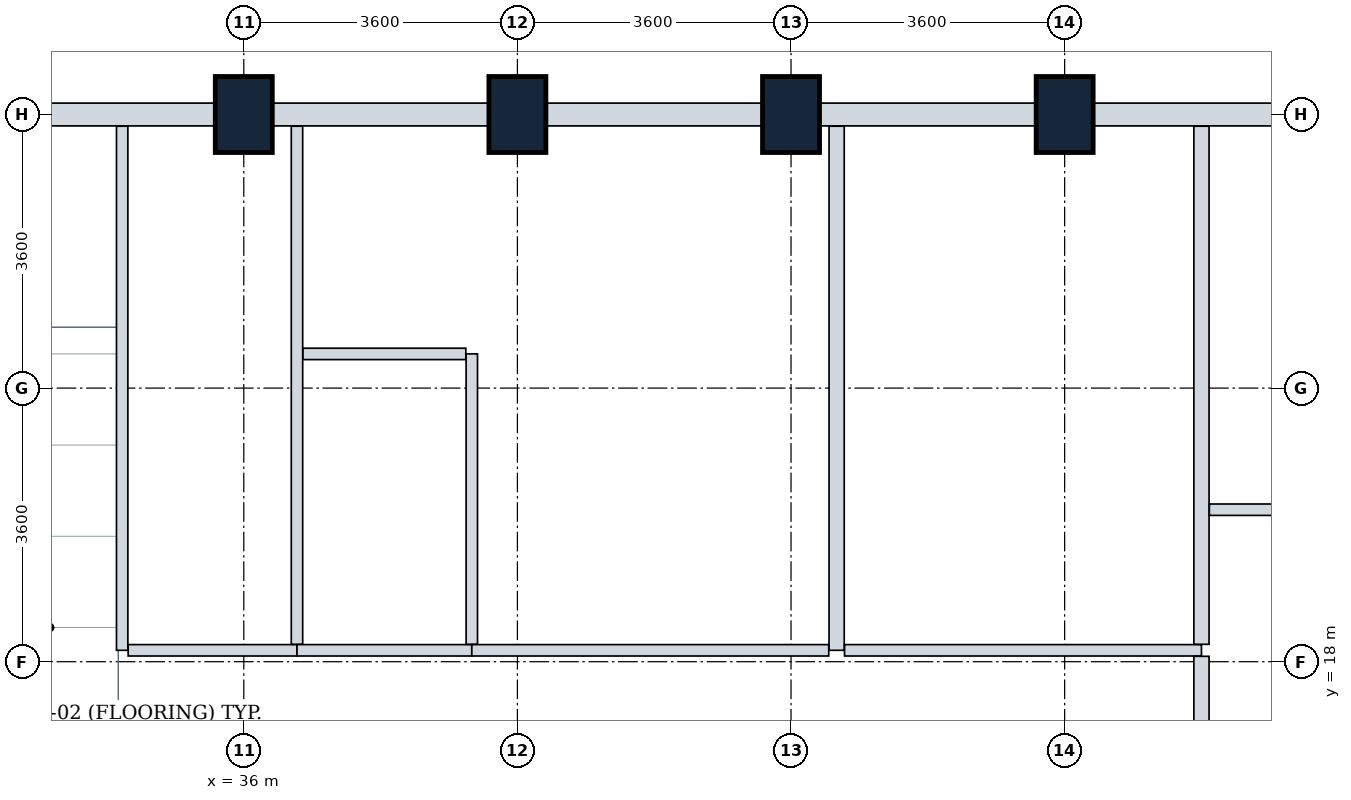
"""IFC4 building model, lengths in metres.
Left out: names, types, materials, properties, quantities, classifications, styles, units other than length and angle.
Written with IfcOpenShell. Run it as: python <this file> out.ifc"""

import sys

from ifc_helpers import new_model, si_unit, direction, frame, frame_2d, origin, origin_2d, place, context, subcontext, project, spatial, rectangle, extrude, element, fill, save


model = new_model("IFC4")
c1 = context("Model", 3, precision=1e-05, world=origin(), true_north=direction((0.0, 1.0)))
c2 = subcontext(c1, "Body", "Model", "MODEL_VIEW")
j1 = project(units=[si_unit("LENGTHUNIT", "METRE"), si_unit("PLANEANGLEUNIT", "RADIAN")], contexts=[c1])
p1 = place(None, origin())
s1 = spatial("IfcSite", under=j1, at=p1, CompositionType="ELEMENT")
p2 = place(p1, origin())
s2 = spatial("IfcBuilding", under=s1, at=p2, CompositionType="ELEMENT")
p3 = place(p2, frame((0.0, 0.0, 139.0)))
s3 = spatial("IfcBuildingStorey", under=s2, at=p3, CompositionType="ELEMENT", Elevation=139.0)
for number, where, z_axis, x_axis in (
    (1, (36.0, 25.2, 0.0), (0.0, 0.0, 1.0), (1.0, 0.0, 0.0)),
    (2, (39.6, 25.2, 0.0), (0.0, 0.0, 1.0), (1.0, 0.0, 0.0)),
    (3, (43.2, 25.2, 0.0), (0.0, 0.0, 1.0), (1.0, 0.0, 0.0)),
    (4, (46.8, 25.2, 0.0), (0.0, 0.0, 1.0), (1.0, 0.0, 0.0)),
):
    element("IfcColumn", number, at=place(p3, frame(where, z_axis=z_axis, x_axis=x_axis)), inside=s3, PredefinedType="COLUMN", context=c2, shape_type="SweptSolid", body=[
        extrude(rectangle(XDim=0.75, YDim=1.0, at=origin_2d()), origin(), (0.0, 0.0, 1.0), 3.8),
    ])
p4 = place(p3, frame((46.8, 25.2, 0.0), z_axis=(0.0, 0.0, 1.0), x_axis=(1.0, 0.0, 0.0)))
e5 = element("IfcWall", 5, at=p4, inside=s3, PredefinedType="STANDARD", context=c2, shape_type="SweptSolid", body=[
    extrude(rectangle(XDim=3.6, YDim=0.3, at=frame_2d((1.8, 0.0))), origin(), (0.0, 0.0, 1.0), 2.93),
])
p5 = place(p3, frame((43.2, 25.2, 0.0), z_axis=(0.0, 0.0, 1.0), x_axis=(1.0, 0.0, 0.0)))
e6 = element("IfcWall", 6, at=p5, inside=s3, PredefinedType="STANDARD", context=c2, shape_type="SweptSolid", body=[
    extrude(rectangle(XDim=3.6, YDim=0.3, at=frame_2d((1.8, 0.0))), origin(), (0.0, 0.0, 1.0), 2.93),
])
p6 = place(p3, frame((39.6, 25.2, 0.0), z_axis=(0.0, 0.0, 1.0), x_axis=(1.0, 0.0, 0.0)))
e7 = element("IfcWall", 7, at=p6, inside=s3, PredefinedType="STANDARD", context=c2, shape_type="SweptSolid", body=[
    extrude(rectangle(XDim=3.6, YDim=0.3, at=frame_2d((1.8, 0.0))), origin(), (0.0, 0.0, 1.0), 2.93),
])
p7 = place(p6, frame((0.75, 0.0, 0.85)))
e8 = element("IfcOpeningElement", 8, at=p7, cuts=e7, PredefinedType="OPENING", context=c2, shape_type="SweptSolid", body=[
    extrude(rectangle(XDim=2.1, YDim=1.35, at=frame_2d((1.05, 0.675))), frame((0.0, 0.16, 0.0), z_axis=(0.0, -1.0, 0.0), x_axis=(1.0, 0.0, 0.0)), (0.0, 0.0, 1.0), 0.32),
])
for number, where, z_axis, x_axis in (
    (9, (36.0, 25.2, 0.0), (0.0, 0.0, 1.0), (1.0, 0.0, 0.0)),
    (10, (32.4, 25.2, 0.0), (0.0, 0.0, 1.0), (1.0, 0.0, 0.0)),
):
    element("IfcWall", number, at=place(p3, frame(where, z_axis=z_axis, x_axis=x_axis)), inside=s3, PredefinedType="STANDARD", context=c2, shape_type="SweptSolid", body=[
        extrude(rectangle(XDim=3.6, YDim=0.3, at=frame_2d((1.8, 0.0))), origin(), (0.0, 0.0, 1.0), 2.93),
    ])
p8 = place(p3, frame((34.4, 18.15, 0.0), z_axis=(0.0, 0.0, 1.0), x_axis=(0.0, 1.0, 0.0)))
e11 = element("IfcWall", 11, at=p8, inside=s3, PredefinedType="PARTITIONING", context=c2, shape_type="SweptSolid", body=[
    extrude(rectangle(XDim=6.896, YDim=0.15, at=frame_2d((3.448, 0.0))), origin(), (0.0, 0.0, 1.0), 2.93),
])
p9 = place(p3, frame((34.479, 18.15, 0.0), z_axis=(0.0, 0.0, 1.0), x_axis=(1.0, 0.0, 0.0)))
e12 = element("IfcWall", 12, at=p9, inside=s3, PredefinedType="PARTITIONING", context=c2, shape_type="SweptSolid", body=[
    extrude(rectangle(XDim=2.221, YDim=0.15, at=frame_2d((1.11, 0.0))), origin(), (0.0, 0.0, 1.0), 3.08),
])
p10 = place(p9, frame((0.618, 0.0, 0.0)))
e13 = element("IfcOpeningElement", 13, at=p10, cuts=e12, PredefinedType="OPENING", context=c2, shape_type="SweptSolid", body=[
    extrude(rectangle(XDim=0.85, YDim=2.1, at=frame_2d((0.425, 1.05))), frame((0.0, 0.085, 0.0), z_axis=(0.0, -1.0, 0.0), x_axis=(1.0, 0.0, 0.0)), (0.0, 0.0, 1.0), 0.17),
])
p11 = place(p3, frame((36.7, 18.229, 0.0), z_axis=(0.0, 0.0, 1.0), x_axis=(0.0, 1.0, 0.0)))
e14 = element("IfcWall", 14, at=p11, inside=s3, PredefinedType="PARTITIONING", context=c2, shape_type="SweptSolid", body=[
    extrude(rectangle(XDim=6.817, YDim=0.15, at=frame_2d((3.408, 0.0))), origin(), (0.0, 0.0, 1.0), 2.93),
])
p12 = place(p3, frame((36.7, 18.15, 0.0), z_axis=(0.0, 0.0, 1.0), x_axis=(1.0, 0.0, 0.0)))
e15 = element("IfcWall", 15, at=p12, inside=s3, PredefinedType="PARTITIONING", context=c2, shape_type="SweptSolid", body=[
    extrude(rectangle(XDim=2.3, YDim=0.15, at=frame_2d((1.15, 0.0))), origin(), (0.0, 0.0, 1.0), 3.08),
])
p13 = place(p12, frame((0.697, 0.0, 0.0)))
e16 = element("IfcOpeningElement", 16, at=p13, cuts=e15, PredefinedType="OPENING", context=c2, shape_type="SweptSolid", body=[
    extrude(rectangle(XDim=0.85, YDim=2.1, at=frame_2d((0.425, 1.05))), frame((0.0, 0.085, 0.0), z_axis=(0.0, -1.0, 0.0), x_axis=(1.0, 0.0, 0.0)), (0.0, 0.0, 1.0), 0.17),
])
p14 = place(p3, frame((39.0, 18.229, 0.0), z_axis=(0.0, 0.0, 1.0), x_axis=(0.0, 1.0, 0.0)))
e17 = element("IfcWall", 17, at=p14, inside=s3, PredefinedType="PARTITIONING", context=c2, shape_type="SweptSolid", body=[
    extrude(rectangle(XDim=3.821, YDim=0.15, at=frame_2d((1.911, 0.0))), origin(), (0.0, 0.0, 1.0), 3.08),
])
p15 = place(p3, frame((36.779, 22.05, 0.0), z_axis=(0.0, 0.0, 1.0), x_axis=(1.0, 0.0, 0.0)))
e18 = element("IfcWall", 18, at=p15, inside=s3, PredefinedType="PARTITIONING", context=c2, shape_type="SweptSolid", body=[
    extrude(rectangle(XDim=2.142, YDim=0.15, at=frame_2d((1.071, 0.0))), origin(), (0.0, 0.0, 1.0), 3.535),
])
p16 = place(p3, frame((43.8, 18.15, 0.0), z_axis=(0.0, 0.0, 1.0), x_axis=(0.0, 1.0, 0.0)))
e19 = element("IfcWall", 19, at=p16, inside=s3, PredefinedType="PARTITIONING", context=c2, shape_type="SweptSolid", body=[
    extrude(rectangle(XDim=6.896, YDim=0.2, at=frame_2d((3.448, 0.0))), origin(), (0.0, 0.0, 1.0), 2.93),
])
p17 = place(p3, frame((39.0, 18.15, 0.0), z_axis=(0.0, 0.0, 1.0), x_axis=(1.0, 0.0, 0.0)))
e20 = element("IfcWall", 20, at=p17, inside=s3, PredefinedType="PARTITIONING", context=c2, shape_type="SweptSolid", body=[
    extrude(rectangle(XDim=4.696, YDim=0.15, at=frame_2d((2.348, 0.0))), origin(), (0.0, 0.0, 1.0), 3.08),
])
p18 = place(p17, frame((1.861, 0.0, 0.0)))
e21 = element("IfcOpeningElement", 21, at=p18, cuts=e20, PredefinedType="OPENING", context=c2, shape_type="SweptSolid", body=[
    extrude(rectangle(XDim=1.0, YDim=2.1, at=frame_2d((0.5, 1.05))), frame((0.0, 0.085, 0.0), z_axis=(0.0, -1.0, 0.0), x_axis=(1.0, 0.0, 0.0)), (0.0, 0.0, 1.0), 0.17),
])
p19 = place(p3, frame((43.904, 18.15, 0.0), z_axis=(0.0, 0.0, 1.0), x_axis=(1.0, 0.0, 0.0)))
e22 = element("IfcWall", 22, at=p19, inside=s3, PredefinedType="PARTITIONING", context=c2, shape_type="SweptSolid", body=[
    extrude(rectangle(XDim=4.696, YDim=0.15, at=frame_2d((2.348, 0.0))), origin(), (0.0, 0.0, 1.0), 3.17),
])
p20 = place(p19, frame((1.757, 0.0, 0.0)))
e23 = element("IfcOpeningElement", 23, at=p20, cuts=e22, PredefinedType="OPENING", context=c2, shape_type="SweptSolid", body=[
    extrude(rectangle(XDim=1.0, YDim=2.1, at=frame_2d((0.5, 1.05))), frame((0.0, 0.085, 0.0), z_axis=(0.0, -1.0, 0.0), x_axis=(1.0, 0.0, 0.0)), (0.0, 0.0, 1.0), 0.17),
])
p21 = place(p3, frame((48.6, 18.229, 0.0), z_axis=(0.0, 0.0, 1.0), x_axis=(0.0, 1.0, 0.0)))
e24 = element("IfcWall", 24, at=p21, inside=s3, PredefinedType="PARTITIONING", context=c2, shape_type="SweptSolid", body=[
    extrude(rectangle(XDim=6.817, YDim=0.2, at=frame_2d((3.408, 0.0))), origin(), (0.0, 0.0, 1.0), 2.93),
])
p22 = place(p3, frame((48.6, 16.404, 0.0), z_axis=(0.0, 0.0, 1.0), x_axis=(0.0, 1.0, 0.0)))
e25 = element("IfcWall", 25, at=p22, inside=s3, PredefinedType="PARTITIONING", context=c2, shape_type="SweptSolid", body=[
    extrude(rectangle(XDim=1.667, YDim=0.2, at=frame_2d((0.833, 0.0))), origin(), (0.0, 0.0, 1.0), 3.535),
])
p23 = place(p22, frame((0.314, 0.0, 0.0)))
e26 = element("IfcOpeningElement", 26, at=p23, cuts=e25, PredefinedType="OPENING", context=c2, shape_type="SweptSolid", body=[
    extrude(rectangle(XDim=1.0, YDim=2.1, at=frame_2d((0.5, 1.05))), frame((0.0, 0.11, 0.0), z_axis=(0.0, -1.0, 0.0), x_axis=(1.0, 0.0, 0.0)), (0.0, 0.0, 1.0), 0.22),
])
p24 = place(p3, frame((48.704, 20.0, 0.0), z_axis=(0.0, 0.0, 1.0), x_axis=(1.0, 0.0, 0.0)))
e27 = element("IfcWall", 27, at=p24, inside=s3, PredefinedType="PARTITIONING", context=c2, shape_type="SweptSolid", body=[
    extrude(rectangle(XDim=5.142, YDim=0.15, at=frame_2d((2.571, 0.0))), origin(), (0.0, 0.0, 1.0), 2.93),
])
p25 = place(p24, frame((1.516, 0.0, 0.0)))
e28 = element("IfcOpeningElement", 28, at=p25, cuts=e27, PredefinedType="OPENING", context=c2, shape_type="SweptSolid", body=[
    extrude(rectangle(XDim=0.9, YDim=2.1, at=frame_2d((0.45, 1.05))), frame((0.0, 0.085, 0.0), z_axis=(0.0, -1.0, 0.0), x_axis=(1.0, 0.0, 0.0)), (0.0, 0.0, 1.0), 0.17),
])
p26 = place(p7, origin())
e29 = element("IfcWindow", 29, at=p26, inside=s3, PartitioningType="SINGLE_PANEL", PredefinedType="WINDOW", context=c2, shape_type="SweptSolid", body=[
    extrude(rectangle(XDim=2.1, YDim=1.35, at=frame_2d((1.05, 0.675))), frame((0.0, 0.03, 0.0), z_axis=(0.0, -1.0, 0.0), x_axis=(1.0, 0.0, 0.0)), (0.0, 0.0, 1.0), 0.06),
])
fill(e8, e29)
p27 = place(p10, origin())
e30 = element("IfcDoor", 30, at=p27, inside=s3, OperationType="SINGLE_SWING_LEFT", PredefinedType="DOOR", context=c2, shape_type="SweptSolid", body=[
    extrude(rectangle(XDim=0.85, YDim=2.1, at=frame_2d((0.425, 1.05))), frame((0.0, 0.025, 0.0), z_axis=(0.0, -1.0, 0.0), x_axis=(1.0, 0.0, 0.0)), (0.0, 0.0, 1.0), 0.05),
])
fill(e13, e30)
p28 = place(p13, origin())
e31 = element("IfcDoor", 31, at=p28, inside=s3, OperationType="SINGLE_SWING_RIGHT", PredefinedType="DOOR", context=c2, shape_type="SweptSolid", body=[
    extrude(rectangle(XDim=0.85, YDim=2.1, at=frame_2d((0.425, 1.05))), frame((0.0, 0.025, 0.0), z_axis=(0.0, -1.0, 0.0), x_axis=(1.0, 0.0, 0.0)), (0.0, 0.0, 1.0), 0.05),
])
fill(e16, e31)
p29 = place(p18, origin())
e32 = element("IfcDoor", 32, at=p29, inside=s3, OperationType="SINGLE_SWING_RIGHT", PredefinedType="DOOR", context=c2, shape_type="SweptSolid", body=[
    extrude(rectangle(XDim=1.0, YDim=2.1, at=frame_2d((0.5, 1.05))), frame((0.0, 0.025, 0.0), z_axis=(0.0, -1.0, 0.0), x_axis=(1.0, 0.0, 0.0)), (0.0, 0.0, 1.0), 0.05),
])
fill(e21, e32)
p30 = place(p20, origin())
e33 = element("IfcDoor", 33, at=p30, inside=s3, OperationType="SINGLE_SWING_RIGHT", PredefinedType="DOOR", context=c2, shape_type="SweptSolid", body=[
    extrude(rectangle(XDim=1.0, YDim=2.1, at=frame_2d((0.5, 1.05))), frame((0.0, 0.025, 0.0), z_axis=(0.0, -1.0, 0.0), x_axis=(1.0, 0.0, 0.0)), (0.0, 0.0, 1.0), 0.05),
])
fill(e23, e33)
p31 = place(p23, origin())
e34 = element("IfcDoor", 34, at=p31, inside=s3, OperationType="SINGLE_SWING_RIGHT", PredefinedType="DOOR", context=c2, shape_type="SweptSolid", body=[
    extrude(rectangle(XDim=1.0, YDim=2.1, at=frame_2d((0.5, 1.05))), frame((0.0, 0.025, 0.0), z_axis=(0.0, -1.0, 0.0), x_axis=(1.0, 0.0, 0.0)), (0.0, 0.0, 1.0), 0.05),
])
fill(e26, e34)
save(model, sys.argv[1])
